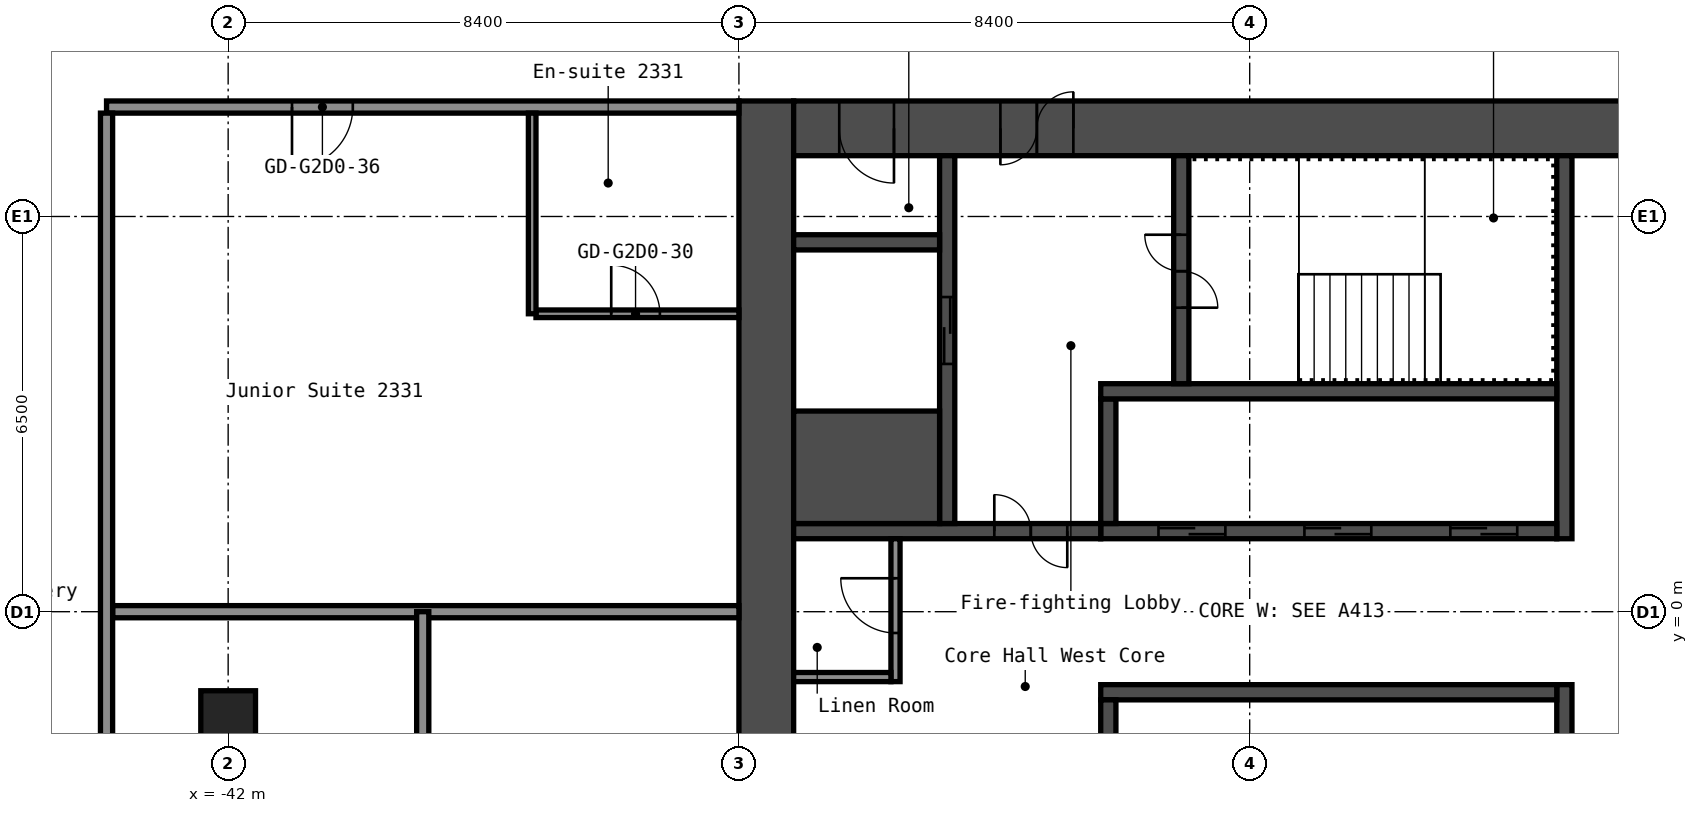
"""IFC4 building model, lengths in metres.
Left out: names, types, materials, properties, quantities, classifications, styles, units other than length and angle.
Written with IfcOpenShell. Run it as: python <this file> out.ifc"""

import sys

from ifc_helpers import new_model, si_unit, direction, frame, frame_2d, origin, origin_2d, place, context, subcontext, project, spatial, rectangle, hollow_rectangle, extrude, element, fill, save


model = new_model("IFC4")
c1 = context("Model", 3, precision=1e-05, world=origin(), true_north=direction((0.0, 1.0)))
c2 = subcontext(c1, "Body", "Model", "MODEL_VIEW")
j1 = project(units=[si_unit("LENGTHUNIT", "METRE"), si_unit("PLANEANGLEUNIT", "RADIAN")], contexts=[c1])
p1 = place(None, origin())
s1 = spatial("IfcSite", under=j1, at=p1, CompositionType="ELEMENT")
p2 = place(p1, origin())
s2 = spatial("IfcBuilding", under=s1, at=p2, CompositionType="ELEMENT")
p3 = place(p2, frame((0.0, 0.0, 85.0)))
s3 = spatial("IfcBuildingStorey", under=s2, at=p3, CompositionType="ELEMENT", Elevation=85.0)
p4 = place(p3, frame((-42.0, -1.75, 0.0), z_axis=(0.0, 0.0, 1.0), x_axis=(1.0, 0.0, 0.0)))
e1 = element("IfcColumn", 1, at=p4, inside=s3, PredefinedType="COLUMN", context=c2, shape_type="SweptSolid", body=[
    extrude(hollow_rectangle(XDim=0.9, YDim=0.9, WallThickness=0.036, at=origin_2d()), origin(), (0.0, 0.0, 1.0), 2.8),
])
p5 = place(p3, frame((-33.15, -8.4, 0.0), z_axis=(0.0, 0.0, 1.0), x_axis=(0.0, 1.0, 0.0)))
e2 = element("IfcWall", 2, at=p5, inside=s3, PredefinedType="SHEAR", context=c2, shape_type="SweptSolid", body=[
    extrude(rectangle(XDim=16.8, YDim=0.9, at=frame_2d((8.4, 0.0))), origin(), (0.0, 0.0, 1.0), 2.8),
])
p6 = place(p3, frame((-32.7, 7.95, 0.0), z_axis=(0.0, 0.0, 1.0), x_axis=(1.0, 0.0, 0.0)))
e3 = element("IfcWall", 3, at=p6, inside=s3, PredefinedType="SHEAR", context=c2, shape_type="SweptSolid", body=[
    extrude(rectangle(XDim=15.0, YDim=0.9, at=frame_2d((7.5, 0.0))), origin(), (0.0, 0.0, 1.0), 2.8),
])
p7 = place(p6, frame((3.4, 0.0, 0.0)))
e4 = element("IfcOpeningElement", 4, at=p7, cuts=e3, PredefinedType="OPENING", context=c2, shape_type="SweptSolid", body=[
    extrude(rectangle(XDim=1.2, YDim=2.1, at=frame_2d((0.6, 1.05))), frame((0.0, 0.46, 0.0), z_axis=(0.0, -1.0, 0.0), x_axis=(1.0, 0.0, 0.0)), (0.0, 0.0, 1.0), 0.92),
])
p8 = place(p6, frame((0.75, 0.0, 0.0)))
e5 = element("IfcOpeningElement", 5, at=p8, cuts=e3, PredefinedType="OPENING", context=c2, shape_type="SweptSolid", body=[
    extrude(rectangle(XDim=0.9, YDim=2.1, at=frame_2d((0.45, 1.05))), frame((0.0, 0.46, 0.0), z_axis=(0.0, -1.0, 0.0), x_axis=(1.0, 0.0, 0.0)), (0.0, 0.0, 1.0), 0.92),
])
p9 = place(p3, frame((-20.025, 1.2, 0.0), z_axis=(0.0, 0.0, 1.0), x_axis=(0.0, 1.0, 0.0)))
e6 = element("IfcWall", 6, at=p9, inside=s3, PredefinedType="SHEAR", context=c2, shape_type="SweptSolid", body=[
    extrude(rectangle(XDim=6.3, YDim=0.25, at=frame_2d((3.15, 0.0))), origin(), (0.0, 0.0, 1.0), 2.8),
])
p10 = place(p3, frame((-20.025, -7.5, 0.0), z_axis=(0.0, 0.0, 1.0), x_axis=(0.0, 1.0, 0.0)))
e7 = element("IfcWall", 7, at=p10, inside=s3, PredefinedType="SHEAR", context=c2, shape_type="SweptSolid", body=[
    extrude(rectangle(XDim=6.3, YDim=0.25, at=frame_2d((3.15, 0.0))), origin(), (0.0, 0.0, 1.0), 2.8),
])
p11 = place(p10, frame((2.4, 0.0, 0.0)))
e8 = element("IfcOpeningElement", 8, at=p11, cuts=e7, PredefinedType="OPENING", context=c2, shape_type="SweptSolid", body=[
    extrude(rectangle(XDim=1.0, YDim=2.1, at=frame_2d((0.5, 1.05))), frame((0.0, 0.135, 0.0), z_axis=(0.0, -1.0, 0.0), x_axis=(1.0, 0.0, 0.0)), (0.0, 0.0, 1.0), 0.27),
])
p12 = place(p3, frame((-27.65, 1.325, 0.0), z_axis=(0.0, 0.0, 1.0), x_axis=(1.0, 0.0, 0.0)))
e9 = element("IfcWall", 9, at=p12, inside=s3, PredefinedType="SHEAR", context=c2, shape_type="SweptSolid", body=[
    extrude(rectangle(XDim=7.5, YDim=0.25, at=frame_2d((3.75, 0.0))), origin(), (0.0, 0.0, 1.0), 2.8),
])
p13 = place(p12, frame((5.75, 0.0, 0.0)))
e10 = element("IfcOpeningElement", 10, at=p13, cuts=e9, PredefinedType="OPENING", context=c2, shape_type="SweptSolid", body=[
    extrude(rectangle(XDim=1.1, YDim=2.1, at=frame_2d((0.55, 1.05))), frame((0.0, 0.135, 0.0), z_axis=(0.0, -1.0, 0.0), x_axis=(1.0, 0.0, 0.0)), (0.0, 0.0, 1.0), 0.27),
])
p14 = place(p12, frame((3.35, 0.0, 0.0)))
e11 = element("IfcOpeningElement", 11, at=p14, cuts=e9, PredefinedType="OPENING", context=c2, shape_type="SweptSolid", body=[
    extrude(rectangle(XDim=1.1, YDim=2.1, at=frame_2d((0.55, 1.05))), frame((0.0, 0.135, 0.0), z_axis=(0.0, -1.0, 0.0), x_axis=(1.0, 0.0, 0.0)), (0.0, 0.0, 1.0), 0.27),
])
p15 = place(p12, frame((0.95, 0.0, 0.0)))
e12 = element("IfcOpeningElement", 12, at=p15, cuts=e9, PredefinedType="OPENING", context=c2, shape_type="SweptSolid", body=[
    extrude(rectangle(XDim=1.1, YDim=2.1, at=frame_2d((0.55, 1.05))), frame((0.0, 0.135, 0.0), z_axis=(0.0, -1.0, 0.0), x_axis=(1.0, 0.0, 0.0)), (0.0, 0.0, 1.0), 0.27),
])
p16 = place(p3, frame((-27.525, 1.45, 0.0), z_axis=(0.0, 0.0, 1.0), x_axis=(0.0, 1.0, 0.0)))
e13 = element("IfcWall", 13, at=p16, inside=s3, PredefinedType="SHEAR", context=c2, shape_type="SweptSolid", body=[
    extrude(rectangle(XDim=2.05, YDim=0.25, at=frame_2d((1.025, 0.0))), origin(), (0.0, 0.0, 1.0), 2.8),
])
p17 = place(p3, frame((-27.65, 3.625, 0.0), z_axis=(0.0, 0.0, 1.0), x_axis=(1.0, 0.0, 0.0)))
e14 = element("IfcWall", 14, at=p17, inside=s3, PredefinedType="SHEAR", context=c2, shape_type="SweptSolid", body=[
    extrude(rectangle(XDim=7.5, YDim=0.25, at=frame_2d((3.75, 0.0))), origin(), (0.0, 0.0, 1.0), 2.8),
])
p18 = place(p3, frame((-26.325, 3.75, 0.0), z_axis=(0.0, 0.0, 1.0), x_axis=(0.0, 1.0, 0.0)))
e15 = element("IfcWall", 15, at=p18, inside=s3, PredefinedType="SHEAR", context=c2, shape_type="SweptSolid", body=[
    extrude(rectangle(XDim=3.75, YDim=0.25, at=frame_2d((1.875, 0.0))), origin(), (0.0, 0.0, 1.0), 2.8),
])
p19 = place(p18, frame((1.25, 0.0, 0.0)))
e16 = element("IfcOpeningElement", 16, at=p19, cuts=e15, PredefinedType="OPENING", context=c2, shape_type="SweptSolid", body=[
    extrude(rectangle(XDim=1.2, YDim=2.1, at=frame_2d((0.6, 1.05))), frame((0.0, 0.135, 0.0), z_axis=(0.0, -1.0, 0.0), x_axis=(1.0, 0.0, 0.0)), (0.0, 0.0, 1.0), 0.27),
])
p20 = place(p3, frame((-32.7, 1.325, 0.0), z_axis=(0.0, 0.0, 1.0), x_axis=(1.0, 0.0, 0.0)))
e17 = element("IfcWall", 17, at=p20, inside=s3, PredefinedType="SHEAR", context=c2, shape_type="SweptSolid", body=[
    extrude(rectangle(XDim=5.05, YDim=0.25, at=frame_2d((2.525, 0.0))), origin(), (0.0, 0.0, 1.0), 2.8),
])
p21 = place(p20, frame((3.3, 0.0, 0.0)))
e18 = element("IfcOpeningElement", 18, at=p21, cuts=e17, PredefinedType="OPENING", context=c2, shape_type="SweptSolid", body=[
    extrude(rectangle(XDim=1.2, YDim=2.1, at=frame_2d((0.6, 1.05))), frame((0.0, 0.135, 0.0), z_axis=(0.0, -1.0, 0.0), x_axis=(1.0, 0.0, 0.0)), (0.0, 0.0, 1.0), 0.27),
])
p22 = place(p3, frame((-30.175, 1.45, 0.0), z_axis=(0.0, 0.0, 1.0), x_axis=(0.0, 1.0, 0.0)))
e19 = element("IfcWall", 19, at=p22, inside=s3, PredefinedType="SHEAR", context=c2, shape_type="SweptSolid", body=[
    extrude(rectangle(XDim=6.05, YDim=0.25, at=frame_2d((3.025, 0.0))), origin(), (0.0, 0.0, 1.0), 2.8),
])
p23 = place(p22, frame((2.625, 0.0, 0.0)))
e20 = element("IfcOpeningElement", 20, at=p23, cuts=e19, PredefinedType="OPENING", context=c2, shape_type="SweptSolid", body=[
    extrude(rectangle(XDim=1.1, YDim=2.1, at=frame_2d((0.55, 1.05))), frame((0.0, 0.135, 0.0), z_axis=(0.0, -1.0, 0.0), x_axis=(1.0, 0.0, 0.0)), (0.0, 0.0, 1.0), 0.27),
])
p24 = place(p3, frame((-32.7, 2.375, 0.0), z_axis=(0.0, 0.0, 1.0), x_axis=(1.0, 0.0, 0.0)))
e21 = element("IfcWall", 21, at=p24, inside=s3, PredefinedType="SHEAR", context=c2, shape_type="SweptSolid", body=[
    extrude(rectangle(XDim=2.4, YDim=1.85, at=frame_2d((1.2, 0.0))), origin(), (0.0, 0.0, 1.0), 2.8),
])
p25 = place(p3, frame((-32.7, 6.075, 0.0), z_axis=(0.0, 0.0, 1.0), x_axis=(1.0, 0.0, 0.0)))
e22 = element("IfcWall", 22, at=p25, inside=s3, PredefinedType="SHEAR", context=c2, shape_type="SweptSolid", body=[
    extrude(rectangle(XDim=2.4, YDim=0.25, at=frame_2d((1.2, 0.0))), origin(), (0.0, 0.0, 1.0), 2.8),
])
p26 = place(p3, frame((-27.65, -1.325, 0.0), z_axis=(0.0, 0.0, 1.0), x_axis=(1.0, 0.0, 0.0)))
e23 = element("IfcWall", 23, at=p26, inside=s3, PredefinedType="SHEAR", context=c2, shape_type="SweptSolid", body=[
    extrude(rectangle(XDim=7.5, YDim=0.25, at=frame_2d((3.75, 0.0))), origin(), (0.0, 0.0, 1.0), 2.8),
])
p27 = place(p3, frame((-27.525, -3.5, 0.0), z_axis=(0.0, 0.0, 1.0), x_axis=(0.0, 1.0, 0.0)))
e24 = element("IfcWall", 24, at=p27, inside=s3, PredefinedType="SHEAR", context=c2, shape_type="SweptSolid", body=[
    extrude(rectangle(XDim=2.05, YDim=0.25, at=frame_2d((1.025, 0.0))), origin(), (0.0, 0.0, 1.0), 2.8),
])
p28 = place(p3, frame((-31.025, -1.15, 0.0), z_axis=(0.0, 0.0, 1.0), x_axis=(0.0, 1.0, 0.0)))
e25 = element("IfcWall", 25, at=p28, inside=s3, PredefinedType="PARTITIONING", context=c2, shape_type="SweptSolid", body=[
    extrude(rectangle(XDim=2.35, YDim=0.15, at=frame_2d((1.175, 0.0))), origin(), (0.0, 0.0, 1.0), 2.8),
])
p29 = place(p28, frame((0.8, 0.0, 0.0)))
e26 = element("IfcOpeningElement", 26, at=p29, cuts=e25, PredefinedType="OPENING", context=c2, shape_type="SweptSolid", body=[
    extrude(rectangle(XDim=0.9, YDim=2.1, at=frame_2d((0.45, 1.05))), frame((0.0, 0.085, 0.0), z_axis=(0.0, -1.0, 0.0), x_axis=(1.0, 0.0, 0.0)), (0.0, 0.0, 1.0), 0.17),
])
p30 = place(p3, frame((-32.7, -1.075, 0.0), z_axis=(0.0, 0.0, 1.0), x_axis=(1.0, 0.0, 0.0)))
e27 = element("IfcWall", 27, at=p30, inside=s3, PredefinedType="PARTITIONING", context=c2, shape_type="SweptSolid", body=[
    extrude(rectangle(XDim=1.6, YDim=0.15, at=frame_2d((0.8, 0.0))), origin(), (0.0, 0.0, 1.0), 2.8),
])
p31 = place(p3, frame((-43.9, 0.0, 0.0), z_axis=(0.0, 0.0, 1.0), x_axis=(1.0, 0.0, 0.0)))
e28 = element("IfcWall", 28, at=p31, inside=s3, PredefinedType="PARTITIONING", context=c2, shape_type="SweptSolid", body=[
    extrude(rectangle(XDim=10.3, YDim=0.2, at=frame_2d((5.15, 0.0))), origin(), (0.0, 0.0, 1.0), 2.8),
])
p32 = place(p3, frame((-36.938, 4.9, 0.0), z_axis=(0.0, 0.0, 1.0), x_axis=(1.0, 0.0, 0.0)))
e29 = element("IfcWall", 29, at=p32, inside=s3, PredefinedType="PARTITIONING", context=c2, shape_type="SweptSolid", body=[
    extrude(rectangle(XDim=3.337, YDim=0.125, at=frame_2d((1.669, 0.0))), origin(), (0.0, 0.0, 1.0), 2.8),
])
p33 = place(p32, frame((1.238, 0.0, 0.0)))
e30 = element("IfcOpeningElement", 30, at=p33, cuts=e29, PredefinedType="OPENING", context=c2, shape_type="SweptSolid", body=[
    extrude(rectangle(XDim=0.8, YDim=2.1, at=frame_2d((0.4, 1.05))), frame((0.0, 0.073, 0.0), z_axis=(0.0, -1.0, 0.0), x_axis=(1.0, 0.0, 0.0)), (0.0, 0.0, 1.0), 0.145),
])
p34 = place(p3, frame((-44.0, 8.3, 0.0), z_axis=(0.0, 0.0, 1.0), x_axis=(1.0, 0.0, 0.0)))
e31 = element("IfcWall", 31, at=p34, inside=s3, PredefinedType="PARTITIONING", context=c2, shape_type="SweptSolid", body=[
    extrude(rectangle(XDim=10.4, YDim=0.2, at=frame_2d((5.2, 0.0))), origin(), (0.0, 0.0, 1.0), 2.8),
])
p35 = place(p34, frame((3.05, 0.0, 0.0)))
e32 = element("IfcOpeningElement", 32, at=p35, cuts=e31, PredefinedType="OPENING", context=c2, shape_type="SweptSolid", body=[
    extrude(rectangle(XDim=1.0, YDim=2.1, at=frame_2d((0.5, 1.05))), frame((0.0, 0.11, 0.0), z_axis=(0.0, -1.0, 0.0), x_axis=(1.0, 0.0, 0.0)), (0.0, 0.0, 1.0), 0.22),
])
p36 = place(p3, frame((-44.0, -8.2, 0.0), z_axis=(0.0, 0.0, 1.0), x_axis=(0.0, 1.0, 0.0)))
e33 = element("IfcWall", 33, at=p36, inside=s3, PredefinedType="PARTITIONING", context=c2, shape_type="SweptSolid", body=[
    extrude(rectangle(XDim=16.4, YDim=0.2, at=frame_2d((8.2, 0.0))), origin(), (0.0, 0.0, 1.0), 2.8),
])
p37 = place(p3, frame((-38.8, -8.2, 0.0), z_axis=(0.0, 0.0, 1.0), x_axis=(0.0, 1.0, 0.0)))
e34 = element("IfcWall", 34, at=p37, inside=s3, PredefinedType="PARTITIONING", context=c2, shape_type="SweptSolid", body=[
    extrude(rectangle(XDim=8.2, YDim=0.2, at=frame_2d((4.1, 0.0))), origin(), (0.0, 0.0, 1.0), 2.8),
])
p38 = place(p3, frame((-37.0, 4.9, 0.0), z_axis=(0.0, 0.0, 1.0), x_axis=(0.0, 1.0, 0.0)))
e35 = element("IfcWall", 35, at=p38, inside=s3, PredefinedType="PARTITIONING", context=c2, shape_type="SweptSolid", body=[
    extrude(rectangle(XDim=3.3, YDim=0.125, at=frame_2d((1.65, 0.0))), origin(), (0.0, 0.0, 1.0), 2.8),
])
p39 = place(p7, origin())
e36 = element("IfcDoor", 36, at=p39, inside=s3, OperationType="DOUBLE_DOOR_SINGLE_SWING", PredefinedType="DOOR", context=c2, shape_type="SweptSolid", body=[
    extrude(rectangle(XDim=1.2, YDim=2.1, at=frame_2d((0.6, 1.05))), frame((0.0, 0.025, 0.0), z_axis=(0.0, -1.0, 0.0), x_axis=(1.0, 0.0, 0.0)), (0.0, 0.0, 1.0), 0.05),
])
fill(e4, e36)
p40 = place(p8, origin())
e37 = element("IfcDoor", 37, at=p40, inside=s3, OperationType="SINGLE_SWING_RIGHT", PredefinedType="DOOR", context=c2, shape_type="SweptSolid", body=[
    extrude(rectangle(XDim=0.9, YDim=2.1, at=frame_2d((0.45, 1.05))), frame((0.0, 0.025, 0.0), z_axis=(0.0, -1.0, 0.0), x_axis=(1.0, 0.0, 0.0)), (0.0, 0.0, 1.0), 0.05),
])
fill(e5, e37)
p41 = place(p19, origin())
e38 = element("IfcDoor", 38, at=p41, inside=s3, OperationType="DOUBLE_DOOR_SINGLE_SWING", PredefinedType="DOOR", context=c2, shape_type="SweptSolid", body=[
    extrude(rectangle(XDim=1.2, YDim=2.1, at=frame_2d((0.6, 1.05))), frame((0.0, 0.025, 0.0), z_axis=(0.0, -1.0, 0.0), x_axis=(1.0, 0.0, 0.0)), (0.0, 0.0, 1.0), 0.05),
])
fill(e16, e38)
p42 = place(p21, origin())
e39 = element("IfcDoor", 39, at=p42, inside=s3, OperationType="DOUBLE_DOOR_SINGLE_SWING", PredefinedType="DOOR", context=c2, shape_type="SweptSolid", body=[
    extrude(rectangle(XDim=1.2, YDim=2.1, at=frame_2d((0.6, 1.05))), frame((0.0, 0.025, 0.0), z_axis=(0.0, -1.0, 0.0), x_axis=(1.0, 0.0, 0.0)), (0.0, 0.0, 1.0), 0.05),
])
fill(e18, e39)
p43 = place(p29, origin())
e40 = element("IfcDoor", 40, at=p43, inside=s3, OperationType="SINGLE_SWING_LEFT", PredefinedType="DOOR", context=c2, shape_type="SweptSolid", body=[
    extrude(rectangle(XDim=0.9, YDim=2.1, at=frame_2d((0.45, 1.05))), frame((0.0, 0.025, 0.0), z_axis=(0.0, -1.0, 0.0), x_axis=(1.0, 0.0, 0.0)), (0.0, 0.0, 1.0), 0.05),
])
fill(e26, e40)
p44 = place(p13, origin())
e41 = element("IfcDoor", 41, at=p44, inside=s3, OperationType="DOUBLE_DOOR_SLIDING", PredefinedType="DOOR", context=c2, shape_type="SweptSolid", body=[
    extrude(rectangle(XDim=1.1, YDim=2.1, at=frame_2d((0.55, 1.05))), frame((0.0, 0.025, 0.0), z_axis=(0.0, -1.0, 0.0), x_axis=(1.0, 0.0, 0.0)), (0.0, 0.0, 1.0), 0.05),
])
fill(e10, e41)
p45 = place(p14, origin())
e42 = element("IfcDoor", 42, at=p45, inside=s3, OperationType="DOUBLE_DOOR_SLIDING", PredefinedType="DOOR", context=c2, shape_type="SweptSolid", body=[
    extrude(rectangle(XDim=1.1, YDim=2.1, at=frame_2d((0.55, 1.05))), frame((0.0, 0.025, 0.0), z_axis=(0.0, -1.0, 0.0), x_axis=(1.0, 0.0, 0.0)), (0.0, 0.0, 1.0), 0.05),
])
fill(e11, e42)
p46 = place(p15, origin())
e43 = element("IfcDoor", 43, at=p46, inside=s3, OperationType="DOUBLE_DOOR_SLIDING", PredefinedType="DOOR", context=c2, shape_type="SweptSolid", body=[
    extrude(rectangle(XDim=1.1, YDim=2.1, at=frame_2d((0.55, 1.05))), frame((0.0, 0.025, 0.0), z_axis=(0.0, -1.0, 0.0), x_axis=(1.0, 0.0, 0.0)), (0.0, 0.0, 1.0), 0.05),
])
fill(e12, e43)
p47 = place(p23, origin())
e44 = element("IfcDoor", 44, at=p47, inside=s3, OperationType="DOUBLE_DOOR_SLIDING", PredefinedType="DOOR", context=c2, shape_type="SweptSolid", body=[
    extrude(rectangle(XDim=1.1, YDim=2.1, at=frame_2d((0.55, 1.05))), frame((0.0, 0.025, 0.0), z_axis=(0.0, -1.0, 0.0), x_axis=(1.0, 0.0, 0.0)), (0.0, 0.0, 1.0), 0.05),
])
fill(e20, e44)
p48 = place(p33, origin())
e45 = element("IfcDoor", 45, at=p48, inside=s3, OperationType="SINGLE_SWING_RIGHT", PredefinedType="DOOR", context=c2, shape_type="SweptSolid", body=[
    extrude(rectangle(XDim=0.8, YDim=2.1, at=frame_2d((0.4, 1.05))), frame((0.0, 0.025, 0.0), z_axis=(0.0, -1.0, 0.0), x_axis=(1.0, 0.0, 0.0)), (0.0, 0.0, 1.0), 0.05),
])
fill(e30, e45)
p49 = place(p35, origin())
e46 = element("IfcDoor", 46, at=p49, inside=s3, OperationType="SINGLE_SWING_LEFT", PredefinedType="DOOR", context=c2, shape_type="SweptSolid", body=[
    extrude(rectangle(XDim=1.0, YDim=2.1, at=frame_2d((0.5, 1.05))), frame((0.0, 0.025, 0.0), z_axis=(0.0, -1.0, 0.0), x_axis=(1.0, 0.0, 0.0)), (0.0, 0.0, 1.0), 0.05),
])
fill(e32, e46)
save(model, sys.argv[1])
